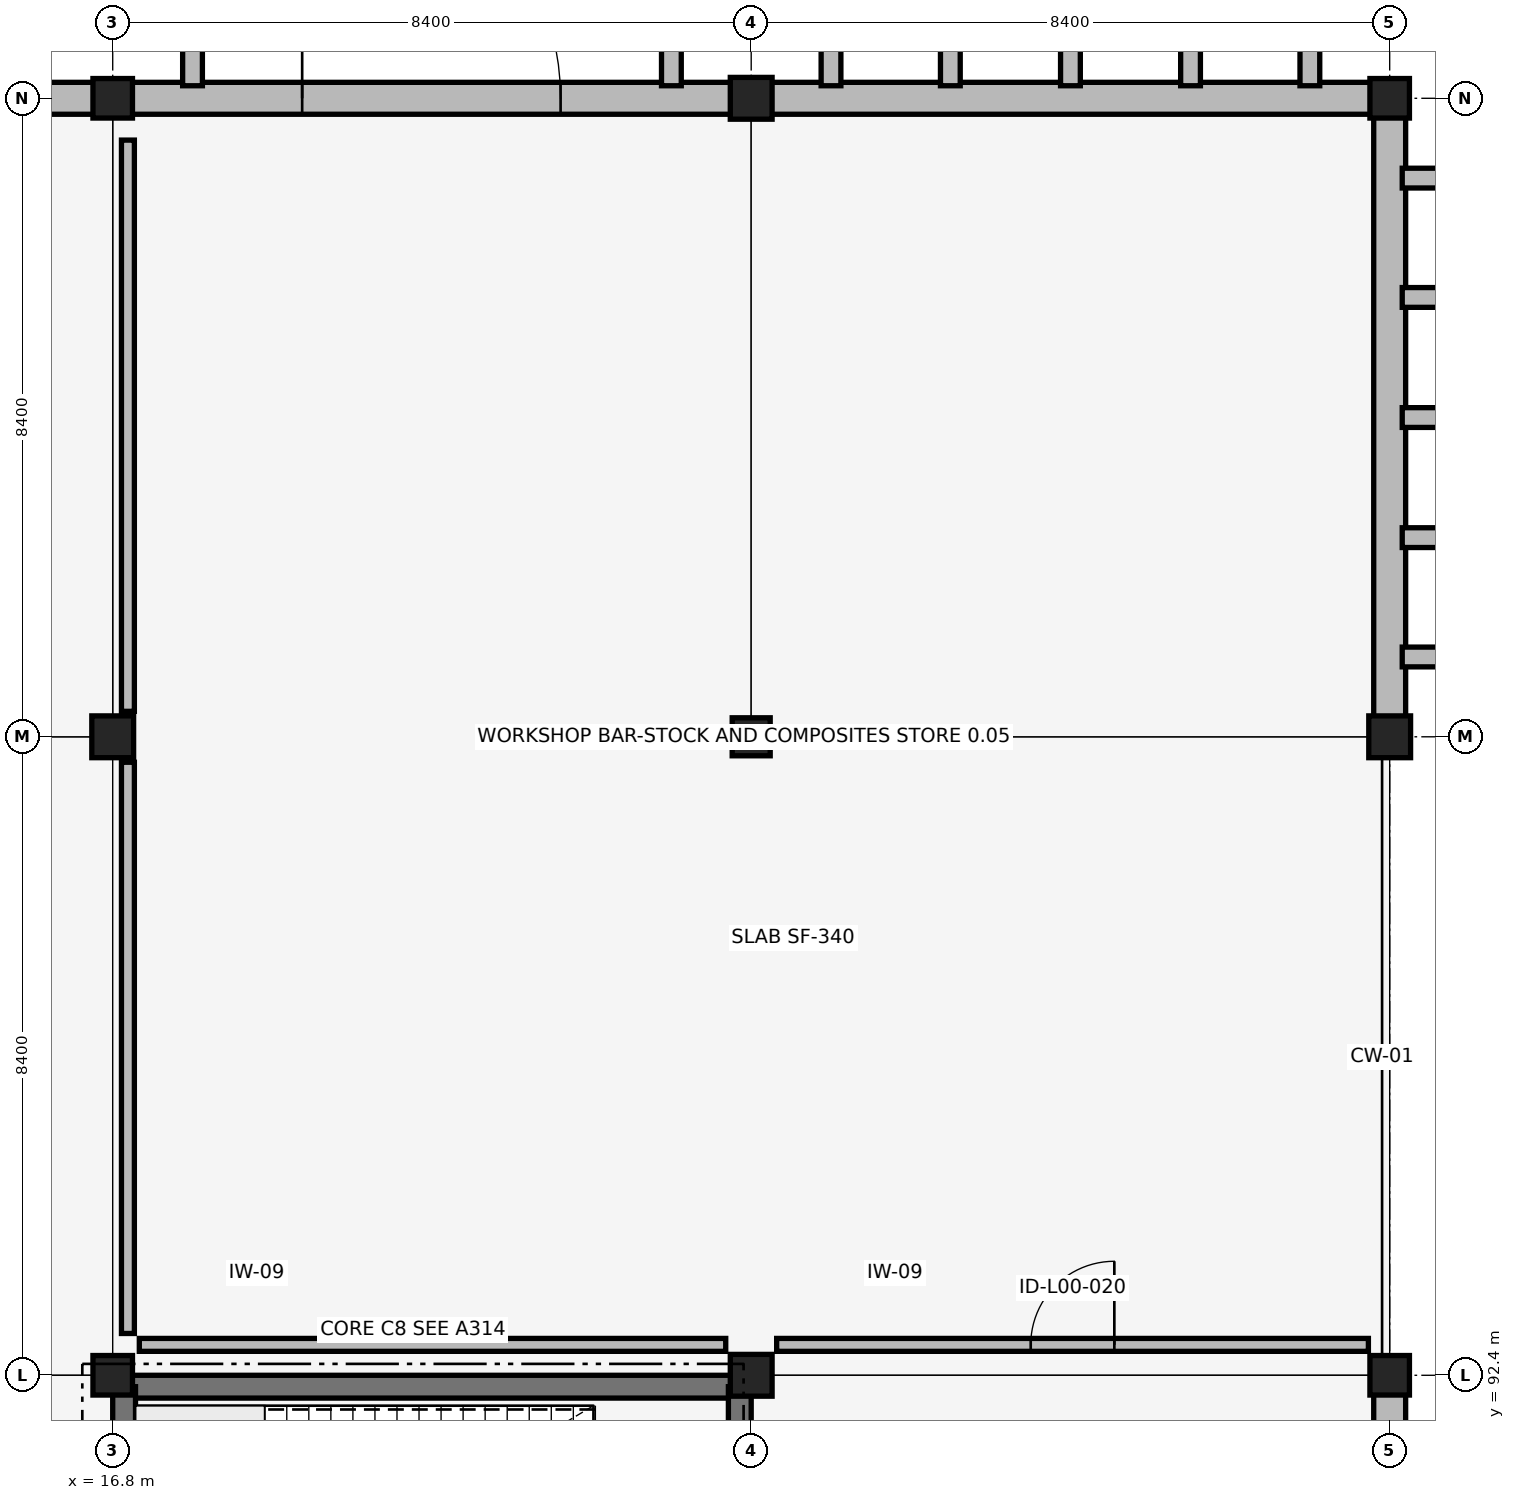
"""IFC4 building model, lengths in metres.
Left out: names, types, materials, properties, quantities, classifications, styles, units other than length and angle.
Written with IfcOpenShell. Run it as: python <this file> out.ifc"""

import sys

from ifc_helpers import new_model, si_unit, direction, frame, frame_2d, origin, origin_2d, place, context, subcontext, project, spatial, rectangle, extrude, element, fill, save


model = new_model("IFC4")
c1 = context("Model", 3, precision=1e-05, world=origin(), true_north=direction((0.0, 1.0)))
c2 = subcontext(c1, "Body", "Model", "MODEL_VIEW")
j1 = project(units=[si_unit("LENGTHUNIT", "METRE"), si_unit("PLANEANGLEUNIT", "RADIAN")], contexts=[c1])
p1 = place(None, origin())
s1 = spatial("IfcSite", under=j1, at=p1, CompositionType="ELEMENT")
p2 = place(p1, origin())
s2 = spatial("IfcBuilding", under=s1, at=p2, CompositionType="ELEMENT")
p3 = place(p2, origin())
s3 = spatial("IfcBuildingStorey", under=s2, at=p3, CompositionType="ELEMENT", Elevation=0.0)
for number, where, z_axis, x_axis in (
    (1, (16.95, 92.25, 0.0), (0.0, 0.0, 1.0), (1.0, 0.0, 0.0)),
    (2, (16.95, 84.15, 0.0), (0.0, 0.0, 1.0), (0.0, 1.0, 0.0)),
):
    element("IfcWall", number, at=place(p3, frame(where, z_axis=z_axis, x_axis=x_axis)), inside=s3, PredefinedType="SHEAR", context=c2, shape_type="SweptSolid", body=[
        extrude(rectangle(XDim=8.1, YDim=0.3, at=frame_2d((4.05, 0.0))), origin(), (0.0, 0.0, 1.0), 5.14),
    ])
p4 = place(p3, frame((25.05, 84.15, 0.0), z_axis=(0.0, 0.0, 1.0), x_axis=(0.0, 1.0, 0.0)))
e3 = element("IfcWall", 3, at=p4, inside=s3, PredefinedType="SHEAR", context=c2, shape_type="SweptSolid", body=[
    extrude(rectangle(XDim=8.1, YDim=0.3, at=frame_2d((4.05, 0.0))), origin(), (0.0, 0.0, 1.0), 5.14),
])
p5 = place(p4, frame((1.325, 0.0, 0.0)))
e4 = element("IfcOpeningElement", 4, at=p5, cuts=e3, PredefinedType="OPENING", context=c2, shape_type="SweptSolid", body=[
    extrude(rectangle(XDim=1.45, YDim=2.15, at=frame_2d((0.725, 1.075))), frame((0.0, 0.16, 0.0), z_axis=(0.0, -1.0, 0.0), x_axis=(1.0, 0.0, 0.0)), (0.0, 0.0, 1.0), 0.32),
])
p6 = place(p3, frame((16.8, 92.4, 0.0), z_axis=(0.0, 0.0, 1.0), x_axis=(1.0, 0.0, 0.0)))
e5 = element("IfcColumn", 5, at=p6, inside=s3, PredefinedType="COLUMN", context=c2, shape_type="SweptSolid", body=[
    extrude(rectangle(XDim=0.52, YDim=0.52, at=origin_2d()), origin(), (0.0, 0.0, 1.0), 5.14),
])
p7 = place(p3, frame((16.8, 100.8, 0.0), z_axis=(0.0, 0.0, 1.0), x_axis=(1.0, 0.0, 0.0)))
e6 = element("IfcColumn", 6, at=p7, inside=s3, PredefinedType="COLUMN", context=c2, shape_type="SweptSolid", body=[
    extrude(rectangle(XDim=0.55, YDim=0.55, at=origin_2d()), origin(), (0.0, 0.0, 1.0), 5.14),
])
p8 = place(p3, frame((16.8, 109.2, 0.0), z_axis=(0.0, 0.0, 1.0), x_axis=(1.0, 0.0, 0.0)))
e7 = element("IfcColumn", 7, at=p8, inside=s3, PredefinedType="COLUMN", context=c2, shape_type="SweptSolid", body=[
    extrude(rectangle(XDim=0.52, YDim=0.52, at=origin_2d()), origin(), (0.0, 0.0, 1.0), 5.14),
])
p9 = place(p3, frame((25.2, 92.4, 0.0), z_axis=(0.0, 0.0, 1.0), x_axis=(1.0, 0.0, 0.0)))
e8 = element("IfcColumn", 8, at=p9, inside=s3, PredefinedType="COLUMN", context=c2, shape_type="SweptSolid", body=[
    extrude(rectangle(XDim=0.55, YDim=0.55, at=origin_2d()), origin(), (0.0, 0.0, 1.0), 5.14),
])
p10 = place(p3, frame((25.2, 100.8, 0.0), z_axis=(0.0, 0.0, 1.0), x_axis=(1.0, 0.0, 0.0)))
e9 = element("IfcColumn", 9, at=p10, inside=s3, PredefinedType="COLUMN", context=c2, shape_type="SweptSolid", body=[
    extrude(rectangle(XDim=0.5, YDim=0.5, at=origin_2d()), origin(), (0.0, 0.0, 1.0), 5.14),
])
p11 = place(p3, frame((25.2, 109.2, 0.0), z_axis=(0.0, 0.0, 1.0), x_axis=(1.0, 0.0, 0.0)))
e10 = element("IfcColumn", 10, at=p11, inside=s3, PredefinedType="COLUMN", context=c2, shape_type="SweptSolid", body=[
    extrude(rectangle(XDim=0.55, YDim=0.55, at=origin_2d()), origin(), (0.0, 0.0, 1.0), 5.14),
])
p12 = place(p3, frame((33.6, 92.4, 0.0), z_axis=(0.0, 0.0, 1.0), x_axis=(1.0, 0.0, 0.0)))
e11 = element("IfcColumn", 11, at=p12, inside=s3, PredefinedType="COLUMN", context=c2, shape_type="SweptSolid", body=[
    extrude(rectangle(XDim=0.52, YDim=0.52, at=origin_2d()), origin(), (0.0, 0.0, 1.0), 5.14),
])
p13 = place(p3, frame((33.6, 100.8, 0.0), z_axis=(0.0, 0.0, 1.0), x_axis=(1.0, 0.0, 0.0)))
e12 = element("IfcColumn", 12, at=p13, inside=s3, PredefinedType="COLUMN", context=c2, shape_type="SweptSolid", body=[
    extrude(rectangle(XDim=0.55, YDim=0.55, at=origin_2d()), origin(), (0.0, 0.0, 1.0), 5.14),
])
p14 = place(p3, frame((33.6, 109.2, 0.0), z_axis=(0.0, 0.0, 1.0), x_axis=(1.0, 0.0, 0.0)))
e13 = element("IfcColumn", 13, at=p14, inside=s3, PredefinedType="COLUMN", context=c2, shape_type="SweptSolid", body=[
    extrude(rectangle(XDim=0.52, YDim=0.52, at=origin_2d()), origin(), (0.0, 0.0, 1.0), 5.14),
])
p15 = place(p3, frame((8.66, 109.2, 0.0), z_axis=(0.0, 0.0, 1.0), x_axis=(1.0, 0.0, 0.0)))
e14 = element("IfcWall", 14, at=p15, inside=s3, PredefinedType="SOLIDWALL", context=c2, shape_type="SweptSolid", body=[
    extrude(rectangle(XDim=7.895, YDim=0.42, at=frame_2d((3.948, 0.0))), origin(), (0.0, 0.0, 1.0), 4.35),
])
p16 = place(p15, frame((2.248, 0.0, 0.0)))
e15 = element("IfcOpeningElement", 15, at=p16, cuts=e14, PredefinedType="OPENING", context=c2, shape_type="SweptSolid", body=[
    extrude(rectangle(XDim=3.4, YDim=3.8, at=frame_2d((1.7, 1.9))), frame((0.0, 0.22, 0.0), z_axis=(0.0, -1.0, 0.0), x_axis=(1.0, 0.0, 0.0)), (0.0, 0.0, 1.0), 0.44),
])
p17 = place(p3, frame((17.045, 109.2, 0.0), z_axis=(0.0, 0.0, 1.0), x_axis=(1.0, 0.0, 0.0)))
e16 = element("IfcWall", 16, at=p17, inside=s3, PredefinedType="SOLIDWALL", context=c2, shape_type="SweptSolid", body=[
    extrude(rectangle(XDim=7.895, YDim=0.42, at=frame_2d((3.948, 0.0))), origin(), (0.0, 0.0, 1.0), 4.35),
])
p18 = place(p17, frame((2.248, 0.0, 0.0)))
e17 = element("IfcOpeningElement", 17, at=p18, cuts=e16, PredefinedType="OPENING", context=c2, shape_type="SweptSolid", body=[
    extrude(rectangle(XDim=3.4, YDim=3.8, at=frame_2d((1.7, 1.9))), frame((0.0, 0.22, 0.0), z_axis=(0.0, -1.0, 0.0), x_axis=(1.0, 0.0, 0.0)), (0.0, 0.0, 1.0), 0.44),
])
for number, where, z_axis, x_axis in (
    (18, (17.85, 109.365, -0.25), (0.0, 0.0, 1.0), (0.0, 1.0, 0.0)),
    (19, (24.15, 109.365, -0.25), (0.0, 0.0, 1.0), (0.0, 1.0, 0.0)),
):
    element("IfcWall", number, at=place(p3, frame(where, z_axis=z_axis, x_axis=x_axis)), inside=s3, PredefinedType="SOLIDWALL", context=c2, shape_type="SweptSolid", body=[
        extrude(rectangle(XDim=0.7, YDim=0.26, at=frame_2d((0.35, 0.0))), origin(), (0.0, 0.0, 1.0), 5.69),
    ])
p19 = place(p3, frame((33.6, 84.435, 0.0), z_axis=(0.0, 0.0, 1.0), x_axis=(0.0, 1.0, 0.0)))
e20 = element("IfcWall", 20, at=p19, inside=s3, PredefinedType="SOLIDWALL", context=c2, shape_type="SweptSolid", body=[
    extrude(rectangle(XDim=7.72, YDim=0.42, at=frame_2d((3.86, 0.0))), origin(), (0.0, 0.0, 1.0), 4.35),
])
p20 = place(p3, frame((25.46, 109.2, 0.0), z_axis=(0.0, 0.0, 1.0), x_axis=(1.0, 0.0, 0.0)))
e21 = element("IfcWall", 21, at=p20, inside=s3, PredefinedType="SOLIDWALL", context=c2, shape_type="SweptSolid", body=[
    extrude(rectangle(XDim=7.895, YDim=0.42, at=frame_2d((3.948, 0.0))), origin(), (0.0, 0.0, 1.0), 4.35),
])
for number, where, z_axis, x_axis in (
    (22, (26.25, 109.365, -0.25), (0.0, 0.0, 1.0), (0.0, 1.0, 0.0)),
    (23, (27.82, 109.365, -0.25), (0.0, 0.0, 1.0), (0.0, 1.0, 0.0)),
    (24, (29.4, 109.365, -0.25), (0.0, 0.0, 1.0), (0.0, 1.0, 0.0)),
    (25, (30.98, 109.365, -0.25), (0.0, 0.0, 1.0), (0.0, 1.0, 0.0)),
    (26, (32.55, 109.365, -0.25), (0.0, 0.0, 1.0), (0.0, 1.0, 0.0)),
):
    element("IfcWall", number, at=place(p3, frame(where, z_axis=z_axis, x_axis=x_axis)), inside=s3, PredefinedType="SOLIDWALL", context=c2, shape_type="SweptSolid", body=[
        extrude(rectangle(XDim=0.7, YDim=0.26, at=frame_2d((0.35, 0.0))), origin(), (0.0, 0.0, 1.0), 5.69),
    ])
p21 = place(p3, frame((33.6, 101.06, 0.0), z_axis=(0.0, 0.0, 1.0), x_axis=(0.0, 1.0, 0.0)))
e27 = element("IfcWall", 27, at=p21, inside=s3, PredefinedType="SOLIDWALL", context=c2, shape_type="SweptSolid", body=[
    extrude(rectangle(XDim=7.895, YDim=0.42, at=frame_2d((3.948, 0.0))), origin(), (0.0, 0.0, 1.0), 4.35),
])
for number, where, z_axis, x_axis in (
    (28, (33.765, 101.85, -0.25), (0.0, 0.0, 1.0), (1.0, 0.0, 0.0)),
    (29, (33.765, 103.42, -0.25), (0.0, 0.0, 1.0), (1.0, 0.0, 0.0)),
    (30, (33.765, 105.0, -0.25), (0.0, 0.0, 1.0), (1.0, 0.0, 0.0)),
    (31, (33.765, 106.58, -0.25), (0.0, 0.0, 1.0), (1.0, 0.0, 0.0)),
    (32, (33.765, 108.15, -0.25), (0.0, 0.0, 1.0), (1.0, 0.0, 0.0)),
):
    element("IfcWall", number, at=place(p3, frame(where, z_axis=z_axis, x_axis=x_axis)), inside=s3, PredefinedType="SOLIDWALL", context=c2, shape_type="SweptSolid", body=[
        extrude(rectangle(XDim=0.7, YDim=0.26, at=frame_2d((0.35, 0.0))), origin(), (0.0, 0.0, 1.0), 5.69),
    ])
p22 = place(p3, frame((17.15, 92.8, 0.0), z_axis=(0.0, 0.0, 1.0), x_axis=(1.0, 0.0, 0.0)))
e33 = element("IfcWall", 33, at=p22, inside=s3, PredefinedType="PARTITIONING", context=c2, shape_type="SweptSolid", body=[
    extrude(rectangle(XDim=7.715, YDim=0.17, at=frame_2d((3.857, 0.0))), origin(), (0.0, 0.0, 1.0), 5.14),
])
p23 = place(p3, frame((25.535, 92.8, 0.0), z_axis=(0.0, 0.0, 1.0), x_axis=(1.0, 0.0, 0.0)))
e34 = element("IfcWall", 34, at=p23, inside=s3, PredefinedType="PARTITIONING", context=c2, shape_type="SweptSolid", body=[
    extrude(rectangle(XDim=7.785, YDim=0.17, at=frame_2d((3.893, 0.0))), origin(), (0.0, 0.0, 1.0), 4.35),
])
p24 = place(p23, frame((3.343, 0.0, 0.0)))
e35 = element("IfcOpeningElement", 35, at=p24, cuts=e34, PredefinedType="OPENING", context=c2, shape_type="SweptSolid", body=[
    extrude(rectangle(XDim=1.1, YDim=2.15, at=frame_2d((0.55, 1.075))), frame((0.0, 0.095, 0.0), z_axis=(0.0, -1.0, 0.0), x_axis=(1.0, 0.0, 0.0)), (0.0, 0.0, 1.0), 0.19),
])
p25 = place(p3, frame((17.0, 92.95, 0.0), z_axis=(0.0, 0.0, 1.0), x_axis=(0.0, 1.0, 0.0)))
e36 = element("IfcWall", 36, at=p25, inside=s3, PredefinedType="PARTITIONING", context=c2, shape_type="SweptSolid", body=[
    extrude(rectangle(XDim=7.515, YDim=0.17, at=frame_2d((3.758, 0.0))), origin(), (0.0, 0.0, 1.0), 4.32),
])
p26 = place(p3, frame((17.0, 101.135, 0.0), z_axis=(0.0, 0.0, 1.0), x_axis=(0.0, 1.0, 0.0)))
e37 = element("IfcWall", 37, at=p26, inside=s3, PredefinedType="PARTITIONING", context=c2, shape_type="SweptSolid", body=[
    extrude(rectangle(XDim=7.515, YDim=0.17, at=frame_2d((3.757, 0.0))), origin(), (0.0, 0.0, 1.0), 4.32),
])
p27 = place(p18, origin())
e38 = element("IfcDoor", 38, at=p27, inside=s3, OperationType="DOUBLE_DOOR_SINGLE_SWING", PredefinedType="GATE", context=c2, shape_type="SweptSolid", body=[
    extrude(rectangle(XDim=3.4, YDim=3.8, at=frame_2d((1.7, 1.9))), frame((0.0, 0.025, 0.0), z_axis=(0.0, -1.0, 0.0), x_axis=(1.0, 0.0, 0.0)), (0.0, 0.0, 1.0), 0.05),
])
fill(e17, e38)
p28 = place(p24, origin())
e39 = element("IfcDoor", 39, at=p28, inside=s3, OperationType="SINGLE_SWING_RIGHT", PredefinedType="DOOR", context=c2, shape_type="SweptSolid", body=[
    extrude(rectangle(XDim=1.1, YDim=2.15, at=frame_2d((0.55, 1.075))), frame((0.0, 0.025, 0.0), z_axis=(0.0, -1.0, 0.0), x_axis=(1.0, 0.0, 0.0)), (0.0, 0.0, 1.0), 0.05),
])
fill(e35, e39)
save(model, sys.argv[1])
